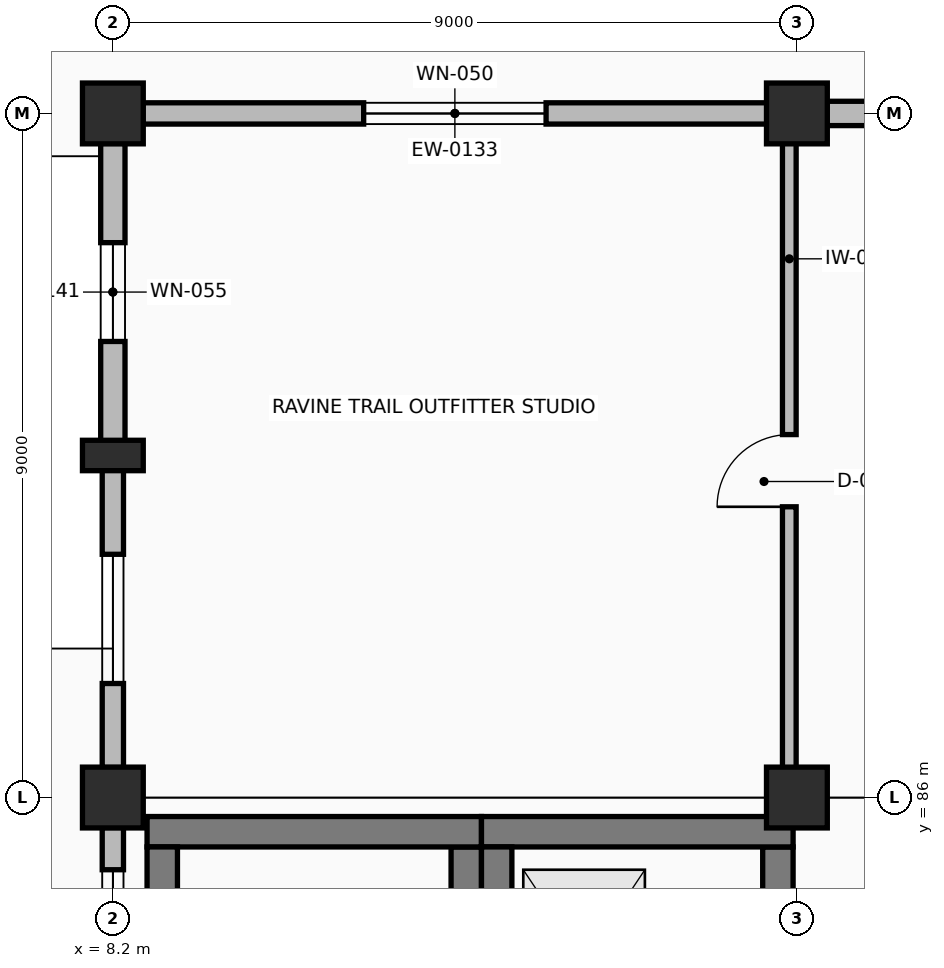
"""IFC4 building model, lengths in metres.
Left out: names, types, materials, properties, quantities, classifications, styles, units other than length and angle.
Written with IfcOpenShell. Run it as: python <this file> out.ifc"""

import sys

from ifc_helpers import new_model, si_unit, direction, frame, frame_2d, origin, origin_2d, place, context, subcontext, project, spatial, rectangle, extrude, element, fill, save


model = new_model("IFC4")
c1 = context("Model", 3, precision=1e-05, world=origin(), true_north=direction((0.0, 1.0)))
c2 = subcontext(c1, "Body", "Model", "MODEL_VIEW")
j1 = project(units=[si_unit("LENGTHUNIT", "METRE"), si_unit("PLANEANGLEUNIT", "RADIAN")], contexts=[c1])
p1 = place(None, origin())
s1 = spatial("IfcSite", under=j1, at=p1, CompositionType="ELEMENT")
p2 = place(p1, origin())
s2 = spatial("IfcBuilding", under=s1, at=p2, CompositionType="ELEMENT")
p3 = place(p2, origin())
s3 = spatial("IfcBuildingStorey", under=s2, at=p3, CompositionType="ELEMENT", Elevation=0.0)
for number, where, z_axis, x_axis in (
    (1, (8.2, 86.0, 0.0), (0.0, 0.0, 1.0), (1.0, 0.0, 0.0)),
    (2, (8.2, 95.0, 0.0), (0.0, 0.0, 1.0), (1.0, 0.0, 0.0)),
    (3, (17.2, 86.0, 0.0), (0.0, 0.0, 1.0), (1.0, 0.0, 0.0)),
    (4, (17.2, 95.0, 0.0), (0.0, 0.0, 1.0), (1.0, 0.0, 0.0)),
):
    element("IfcColumn", number, at=place(p3, frame(where, z_axis=z_axis, x_axis=x_axis)), inside=s3, PredefinedType="COLUMN", context=c2, shape_type="SweptSolid", body=[
        extrude(rectangle(XDim=0.8, YDim=0.8, at=origin_2d()), origin(), (0.0, 0.0, 1.0), 4.8),
    ])
p4 = place(p3, frame((8.2, 90.5, 0.0), z_axis=(0.0, 0.0, 1.0), x_axis=(0.0, 1.0, 0.0)))
e5 = element("IfcColumn", 5, at=p4, inside=s3, PredefinedType="PILASTER", context=c2, shape_type="SweptSolid", body=[
    extrude(rectangle(XDim=0.4, YDim=0.8, at=origin_2d()), origin(), (0.0, 0.0, 1.0), 4.8),
])
p5 = place(p3, frame((16.805, 95.0, 0.0), z_axis=(0.0, 0.0, 1.0), x_axis=(-1.0, 0.0, 0.0)))
e6 = element("IfcWall", 6, at=p5, inside=s3, PredefinedType="SOLIDWALL", context=c2, shape_type="SweptSolid", body=[
    extrude(rectangle(XDim=8.21, YDim=0.28, at=frame_2d((4.105, 0.0))), origin(), (0.0, 0.0, 1.0), 3.747),
])
p6 = place(p5, frame((2.905, 0.0, 0.9)))
e7 = element("IfcOpeningElement", 7, at=p6, cuts=e6, PredefinedType="OPENING", context=c2, shape_type="SweptSolid", body=[
    extrude(rectangle(XDim=2.4, YDim=1.5, at=frame_2d((1.2, 0.75))), frame((0.0, 0.15, 0.0), z_axis=(0.0, -1.0, 0.0), x_axis=(1.0, 0.0, 0.0)), (0.0, 0.0, 1.0), 0.3),
])
p7 = place(p3, frame((25.805, 95.0, 0.0), z_axis=(0.0, 0.0, 1.0), x_axis=(-1.0, 0.0, 0.0)))
e8 = element("IfcWall", 8, at=p7, inside=s3, PredefinedType="SOLIDWALL", context=c2, shape_type="SweptSolid", body=[
    extrude(rectangle(XDim=8.21, YDim=0.32, at=frame_2d((4.105, 0.0))), origin(), (0.0, 0.0, 1.0), 3.747),
])
p8 = place(p7, frame((3.555, 0.0, 0.0)))
e9 = element("IfcOpeningElement", 9, at=p8, cuts=e8, PredefinedType="OPENING", context=c2, shape_type="SweptSolid", body=[
    extrude(rectangle(XDim=1.1, YDim=2.2, at=frame_2d((0.55, 1.1))), frame((0.0, 0.17, 0.0), z_axis=(0.0, -1.0, 0.0), x_axis=(1.0, 0.0, 0.0)), (0.0, 0.0, 1.0), 0.34),
])
p9 = place(p3, frame((8.2, 85.605, 0.0), z_axis=(0.0, 0.0, 1.0), x_axis=(0.0, -1.0, 0.0)))
e10 = element("IfcWall", 10, at=p9, inside=s3, PredefinedType="SOLIDWALL", context=c2, shape_type="SweptSolid", body=[
    extrude(rectangle(XDim=3.91, YDim=0.28, at=frame_2d((1.955, 0.0))), origin(), (0.0, 0.0, 1.0), 4.135),
])
p10 = place(p9, frame((0.555, 0.0, 0.9)))
e11 = element("IfcOpeningElement", 11, at=p10, cuts=e10, PredefinedType="OPENING", context=c2, shape_type="SweptSolid", body=[
    extrude(rectangle(XDim=2.8, YDim=1.4, at=frame_2d((1.4, 0.7))), frame((0.0, 0.15, 0.0), z_axis=(0.0, -1.0, 0.0), x_axis=(1.0, 0.0, 0.0)), (0.0, 0.0, 1.0), 0.3),
])
p11 = place(p3, frame((8.2, 94.605, 0.0), z_axis=(0.0, 0.0, 1.0), x_axis=(0.0, -1.0, 0.0)))
e12 = element("IfcWall", 12, at=p11, inside=s3, PredefinedType="SOLIDWALL", context=c2, shape_type="SweptSolid", body=[
    extrude(rectangle(XDim=3.91, YDim=0.32, at=frame_2d((1.955, 0.0))), origin(), (0.0, 0.0, 1.0), 4.135),
])
p12 = place(p11, frame((1.305, 0.0, 0.9)))
e13 = element("IfcOpeningElement", 13, at=p12, cuts=e12, PredefinedType="OPENING", context=c2, shape_type="SweptSolid", body=[
    extrude(rectangle(XDim=1.3, YDim=1.45, at=frame_2d((0.65, 0.725))), frame((0.0, 0.17, 0.0), z_axis=(0.0, -1.0, 0.0), x_axis=(1.0, 0.0, 0.0)), (0.0, 0.0, 1.0), 0.34),
])
p13 = place(p3, frame((8.2, 90.305, 0.0), z_axis=(0.0, 0.0, 1.0), x_axis=(0.0, -1.0, 0.0)))
e14 = element("IfcWall", 14, at=p13, inside=s3, PredefinedType="SOLIDWALL", context=c2, shape_type="SweptSolid", body=[
    extrude(rectangle(XDim=3.91, YDim=0.28, at=frame_2d((1.955, 0.0))), origin(), (0.0, 0.0, 1.0), 4.135),
])
p14 = place(p13, frame((1.105, 0.0, 0.9)))
e15 = element("IfcOpeningElement", 15, at=p14, cuts=e14, PredefinedType="OPENING", context=c2, shape_type="SweptSolid", body=[
    extrude(rectangle(XDim=1.7, YDim=1.5, at=frame_2d((0.85, 0.75))), frame((0.0, 0.15, 0.0), z_axis=(0.0, -1.0, 0.0), x_axis=(1.0, 0.0, 0.0)), (0.0, 0.0, 1.0), 0.3),
])
p15 = place(p3, frame((12.85, 77.75, 0.0), z_axis=(0.0, 0.0, 1.0), x_axis=(0.0, 1.0, 0.0)))
e16 = element("IfcWall", 16, at=p15, inside=s3, PredefinedType="SHEAR", context=c2, shape_type="SweptSolid", body=[
    extrude(rectangle(XDim=7.6, YDim=0.4, at=frame_2d((3.8, 0.0))), origin(), (0.0, 0.0, 1.0), 4.49),
])
p16 = place(p15, frame((0.35, 0.0, 0.0)))
e17 = element("IfcOpeningElement", 17, at=p16, cuts=e16, PredefinedType="OPENING", context=c2, shape_type="SweptSolid", body=[
    extrude(rectangle(XDim=1.1, YDim=2.2, at=frame_2d((0.55, 1.1))), frame((0.0, 0.21, 0.0), z_axis=(0.0, -1.0, 0.0), x_axis=(1.0, 0.0, 0.0)), (0.0, 0.0, 1.0), 0.42),
])
p17 = place(p3, frame((13.05, 85.55, 0.0), z_axis=(0.0, 0.0, 1.0), x_axis=(-1.0, 0.0, 0.0)))
e18 = element("IfcWall", 18, at=p17, inside=s3, PredefinedType="SHEAR", context=c2, shape_type="SweptSolid", body=[
    extrude(rectangle(XDim=4.4, YDim=0.4, at=frame_2d((2.2, 0.0))), origin(), (0.0, 0.0, 1.0), 4.49),
])
p18 = place(p3, frame((8.85, 85.35, 0.0), z_axis=(0.0, 0.0, 1.0), x_axis=(0.0, -1.0, 0.0)))
e19 = element("IfcWall", 19, at=p18, inside=s3, PredefinedType="SHEAR", context=c2, shape_type="SweptSolid", body=[
    extrude(rectangle(XDim=7.6, YDim=0.4, at=frame_2d((3.8, 0.0))), origin(), (0.0, 0.0, 1.0), 4.49),
])
p19 = place(p3, frame((16.95, 82.4, 0.0), z_axis=(0.0, 0.0, 1.0), x_axis=(0.0, 1.0, 0.0)))
e20 = element("IfcWall", 20, at=p19, inside=s3, PredefinedType="SHEAR", context=c2, shape_type="SweptSolid", body=[
    extrude(rectangle(XDim=2.95, YDim=0.4, at=frame_2d((1.475, 0.0))), origin(), (0.0, 0.0, 1.0), 4.49),
])
p20 = place(p3, frame((17.15, 85.55, 0.0), z_axis=(0.0, 0.0, 1.0), x_axis=(-1.0, 0.0, 0.0)))
e21 = element("IfcWall", 21, at=p20, inside=s3, PredefinedType="SHEAR", context=c2, shape_type="SweptSolid", body=[
    extrude(rectangle(XDim=4.1, YDim=0.4, at=frame_2d((2.05, 0.0))), origin(), (0.0, 0.0, 1.0), 4.49),
])
p21 = place(p3, frame((13.25, 85.35, 0.0), z_axis=(0.0, 0.0, 1.0), x_axis=(0.0, -1.0, 0.0)))
e22 = element("IfcWall", 22, at=p21, inside=s3, PredefinedType="SHEAR", context=c2, shape_type="SweptSolid", body=[
    extrude(rectangle(XDim=2.95, YDim=0.4, at=frame_2d((1.475, 0.0))), origin(), (0.0, 0.0, 1.0), 4.49),
])
p22 = place(p3, frame((17.1, 85.8, 0.0), z_axis=(0.0, 0.0, 1.0), x_axis=(0.0, 1.0, 0.0)))
e23 = element("IfcWall", 23, at=p22, inside=s3, PredefinedType="STANDARD", context=c2, shape_type="SweptSolid", body=[
    extrude(rectangle(XDim=9.0, YDim=0.18, at=frame_2d((4.5, 0.0))), origin(), (0.0, 0.0, 1.0), 3.737),
])
p23 = place(p22, frame((4.025, 0.0, 0.0)))
e24 = element("IfcOpeningElement", 24, at=p23, cuts=e23, PredefinedType="OPENING", context=c2, shape_type="SweptSolid", body=[
    extrude(rectangle(XDim=0.95, YDim=2.15, at=frame_2d((0.475, 1.075))), frame((0.0, 0.1, 0.0), z_axis=(0.0, -1.0, 0.0), x_axis=(1.0, 0.0, 0.0)), (0.0, 0.0, 1.0), 0.2),
])
p24 = place(p6, origin())
e25 = element("IfcWindow", 25, at=p24, inside=s3, PartitioningType="SINGLE_PANEL", PredefinedType="WINDOW", context=c2, shape_type="SweptSolid", body=[
    extrude(rectangle(XDim=2.4, YDim=1.5, at=frame_2d((1.2, 0.75))), frame((0.0, 0.03, 0.0), z_axis=(0.0, -1.0, 0.0), x_axis=(1.0, 0.0, 0.0)), (0.0, 0.0, 1.0), 0.06),
])
fill(e7, e25)
p25 = place(p10, origin())
e26 = element("IfcWindow", 26, at=p25, inside=s3, PartitioningType="SINGLE_PANEL", PredefinedType="WINDOW", context=c2, shape_type="SweptSolid", body=[
    extrude(rectangle(XDim=2.8, YDim=1.4, at=frame_2d((1.4, 0.7))), frame((0.0, 0.03, 0.0), z_axis=(0.0, -1.0, 0.0), x_axis=(1.0, 0.0, 0.0)), (0.0, 0.0, 1.0), 0.06),
])
fill(e11, e26)
p26 = place(p12, origin())
e27 = element("IfcWindow", 27, at=p26, inside=s3, PartitioningType="SINGLE_PANEL", PredefinedType="WINDOW", context=c2, shape_type="SweptSolid", body=[
    extrude(rectangle(XDim=1.3, YDim=1.45, at=frame_2d((0.65, 0.725))), frame((0.0, 0.03, 0.0), z_axis=(0.0, -1.0, 0.0), x_axis=(1.0, 0.0, 0.0)), (0.0, 0.0, 1.0), 0.06),
])
fill(e13, e27)
p27 = place(p14, origin())
e28 = element("IfcWindow", 28, at=p27, inside=s3, PartitioningType="SINGLE_PANEL", PredefinedType="WINDOW", context=c2, shape_type="SweptSolid", body=[
    extrude(rectangle(XDim=1.7, YDim=1.5, at=frame_2d((0.85, 0.75))), frame((0.0, 0.03, 0.0), z_axis=(0.0, -1.0, 0.0), x_axis=(1.0, 0.0, 0.0)), (0.0, 0.0, 1.0), 0.06),
])
fill(e15, e28)
p28 = place(p23, origin())
e29 = element("IfcDoor", 29, at=p28, inside=s3, OperationType="SINGLE_SWING_LEFT", PredefinedType="DOOR", context=c2, shape_type="SweptSolid", body=[
    extrude(rectangle(XDim=0.95, YDim=2.15, at=frame_2d((0.475, 1.075))), frame((0.0, 0.025, 0.0), z_axis=(0.0, -1.0, 0.0), x_axis=(1.0, 0.0, 0.0)), (0.0, 0.0, 1.0), 0.05),
])
fill(e24, e29)
save(model, sys.argv[1])
